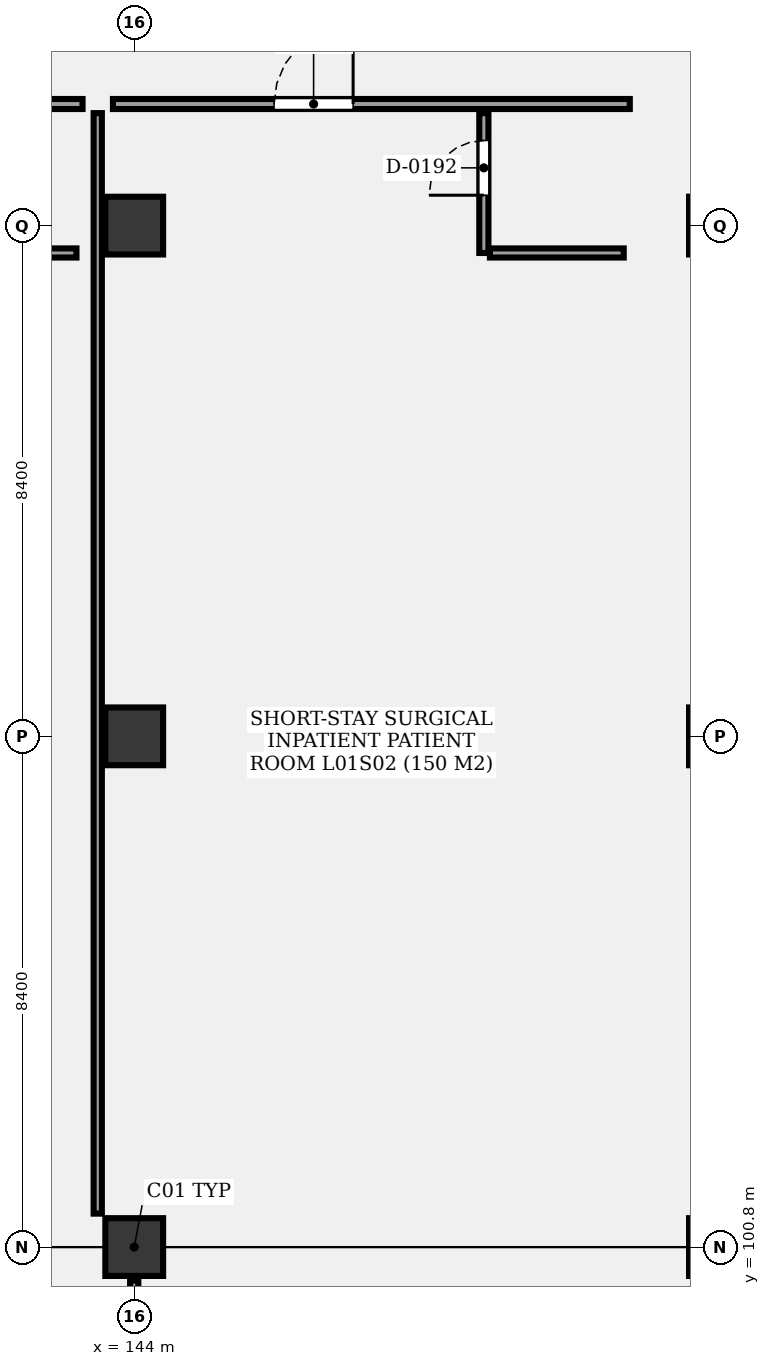
"""IFC4 building model, lengths in metres.
Left out: names, types, materials, properties, quantities, classifications, styles, units other than length and angle.
Written with IfcOpenShell. Run it as: python <this file> out.ifc"""

import sys

from ifc_helpers import new_model, si_unit, direction, frame, frame_2d, origin, origin_2d, place, context, subcontext, project, spatial, rectangle, extrude, element, fill, save


model = new_model("IFC4")
c1 = context("Model", 3, precision=1e-05, world=origin(), true_north=direction((0.0, 1.0)))
c2 = subcontext(c1, "Body", "Model", "MODEL_VIEW")
j1 = project(units=[si_unit("LENGTHUNIT", "METRE"), si_unit("PLANEANGLEUNIT", "RADIAN")], contexts=[c1])
p1 = place(None, origin())
s1 = spatial("IfcSite", under=j1, at=p1, CompositionType="ELEMENT")
p2 = place(p1, origin())
s2 = spatial("IfcBuilding", under=s1, at=p2, CompositionType="ELEMENT")
p3 = place(p2, frame((0.0, 0.0, 5.1)))
s3 = spatial("IfcBuildingStorey", under=s2, at=p3, CompositionType="ELEMENT", Elevation=5.1)
for number, where, z_axis, x_axis in (
    (1, (144.0, 100.8, 0.0), (0.0, 0.0, 1.0), (1.0, 0.0, 0.0)),
    (2, (144.0, 109.2, 0.0), (0.0, 0.0, 1.0), (1.0, 0.0, 0.0)),
    (3, (144.0, 117.6, 0.0), (0.0, 0.0, 1.0), (1.0, 0.0, 0.0)),
    (4, (153.6, 100.8, 0.0), (0.0, 0.0, 1.0), (1.0, 0.0, 0.0)),
    (5, (153.6, 109.2, 0.0), (0.0, 0.0, 1.0), (1.0, 0.0, 0.0)),
    (6, (153.6, 117.6, 0.0), (0.0, 0.0, 1.0), (1.0, 0.0, 0.0)),
):
    element("IfcColumn", number, at=place(p3, frame(where, z_axis=z_axis, x_axis=x_axis)), inside=s3, PredefinedType="COLUMN", context=c2, shape_type="SweptSolid", body=[
        extrude(rectangle(XDim=0.95, YDim=0.95, at=origin_2d()), origin(), (0.0, 0.0, 1.0), 4.8),
    ])
p4 = place(p3, frame((144.0, 90.55, 0.0), z_axis=(0.0, 0.0, 1.0), x_axis=(0.0, 1.0, 0.0)))
e7 = element("IfcWall", 7, at=p4, inside=s3, PredefinedType="PARTITIONING", context=c2, shape_type="SweptSolid", body=[
    extrude(rectangle(XDim=9.7, YDim=0.135, at=frame_2d((4.85, 0.0))), origin(), (0.0, 0.0, 1.0), 3.68),
])
p5 = place(p3, frame((134.65, 119.6, 0.0), z_axis=(0.0, 0.0, 1.0), x_axis=(1.0, 0.0, 0.0)))
e8 = element("IfcWall", 8, at=p5, inside=s3, PredefinedType="PARTITIONING", context=c2, shape_type="SweptSolid", body=[
    extrude(rectangle(XDim=8.5, YDim=0.165, at=frame_2d((4.25, 0.0))), origin(), (0.0, 0.0, 1.0), 3.68),
])
p6 = place(p5, frame((2.65, 0.0, 0.0)))
e9 = element("IfcOpeningElement", 9, at=p6, cuts=e8, PredefinedType="OPENING", context=c2, shape_type="SweptSolid", body=[
    extrude(rectangle(XDim=1.25, YDim=2.2, at=frame_2d((0.625, 1.1))), frame((0.0, 0.093, 0.0), z_axis=(0.0, -1.0, 0.0), x_axis=(1.0, 0.0, 0.0)), (0.0, 0.0, 1.0), 0.185),
])
p7 = place(p3, frame((140.85, 117.15, 0.0), z_axis=(0.0, 0.0, 1.0), x_axis=(1.0, 0.0, 0.0)))
e10 = element("IfcWall", 10, at=p7, inside=s3, PredefinedType="PARTITIONING", context=c2, shape_type="SweptSolid", body=[
    extrude(rectangle(XDim=2.2, YDim=0.15, at=frame_2d((1.1, 0.0))), origin(), (0.0, 0.0, 1.0), 3.68),
])
p8 = place(p3, frame((143.65, 119.6, 0.0), z_axis=(0.0, 0.0, 1.0), x_axis=(1.0, 0.0, 0.0)))
e11 = element("IfcWall", 11, at=p8, inside=s3, PredefinedType="PARTITIONING", context=c2, shape_type="SweptSolid", body=[
    extrude(rectangle(XDim=8.5, YDim=0.165, at=frame_2d((4.25, 0.0))), origin(), (0.0, 0.0, 1.0), 3.68),
])
p9 = place(p8, frame((2.65, 0.0, 0.0)))
e12 = element("IfcOpeningElement", 12, at=p9, cuts=e11, PredefinedType="OPENING", context=c2, shape_type="SweptSolid", body=[
    extrude(rectangle(XDim=1.3, YDim=2.2, at=frame_2d((0.65, 1.1))), frame((0.0, 0.093, 0.0), z_axis=(0.0, -1.0, 0.0), x_axis=(1.0, 0.0, 0.0)), (0.0, 0.0, 1.0), 0.185),
])
p10 = place(p3, frame((149.75, 117.15, 0.0), z_axis=(0.0, 0.0, 1.0), x_axis=(0.0, 1.0, 0.0)))
e13 = element("IfcWall", 13, at=p10, inside=s3, PredefinedType="PARTITIONING", context=c2, shape_type="SweptSolid", body=[
    extrude(rectangle(XDim=2.3, YDim=0.15, at=frame_2d((1.15, 0.0))), origin(), (0.0, 0.0, 1.0), 3.68),
])
p11 = place(p10, frame((0.95, 0.0, 0.0)))
e14 = element("IfcOpeningElement", 14, at=p11, cuts=e13, PredefinedType="OPENING", context=c2, shape_type="SweptSolid", body=[
    extrude(rectangle(XDim=0.9, YDim=2.1, at=frame_2d((0.45, 1.05))), frame((0.0, 0.085, 0.0), z_axis=(0.0, -1.0, 0.0), x_axis=(1.0, 0.0, 0.0)), (0.0, 0.0, 1.0), 0.17),
])
p12 = place(p3, frame((149.85, 117.15, 0.0), z_axis=(0.0, 0.0, 1.0), x_axis=(1.0, 0.0, 0.0)))
e15 = element("IfcWall", 15, at=p12, inside=s3, PredefinedType="PARTITIONING", context=c2, shape_type="SweptSolid", body=[
    extrude(rectangle(XDim=2.2, YDim=0.15, at=frame_2d((1.1, 0.0))), origin(), (0.0, 0.0, 1.0), 3.68),
])
p13 = place(p3, frame((143.4, 101.35, 0.0), z_axis=(0.0, 0.0, 1.0), x_axis=(0.0, 1.0, 0.0)))
e16 = element("IfcWall", 16, at=p13, inside=s3, PredefinedType="PARTITIONING", context=c2, shape_type="SweptSolid", body=[
    extrude(rectangle(XDim=18.1, YDim=0.135, at=frame_2d((9.05, 0.0))), origin(), (0.0, 0.0, 1.0), 3.68),
])
p14 = place(p9, origin())
e17 = element("IfcDoor", 17, at=p14, inside=s3, OperationType="SINGLE_SWING_RIGHT", PredefinedType="DOOR", context=c2, shape_type="SweptSolid", body=[
    extrude(rectangle(XDim=1.3, YDim=2.2, at=frame_2d((0.65, 1.1))), frame((0.0, 0.025, 0.0), z_axis=(0.0, -1.0, 0.0), x_axis=(1.0, 0.0, 0.0)), (0.0, 0.0, 1.0), 0.05),
])
fill(e12, e17)
p15 = place(p11, origin())
e18 = element("IfcDoor", 18, at=p15, inside=s3, OperationType="SINGLE_SWING_LEFT", PredefinedType="DOOR", context=c2, shape_type="SweptSolid", body=[
    extrude(rectangle(XDim=0.9, YDim=2.1, at=frame_2d((0.45, 1.05))), frame((0.0, 0.025, 0.0), z_axis=(0.0, -1.0, 0.0), x_axis=(1.0, 0.0, 0.0)), (0.0, 0.0, 1.0), 0.05),
])
fill(e14, e18)
save(model, sys.argv[1])
